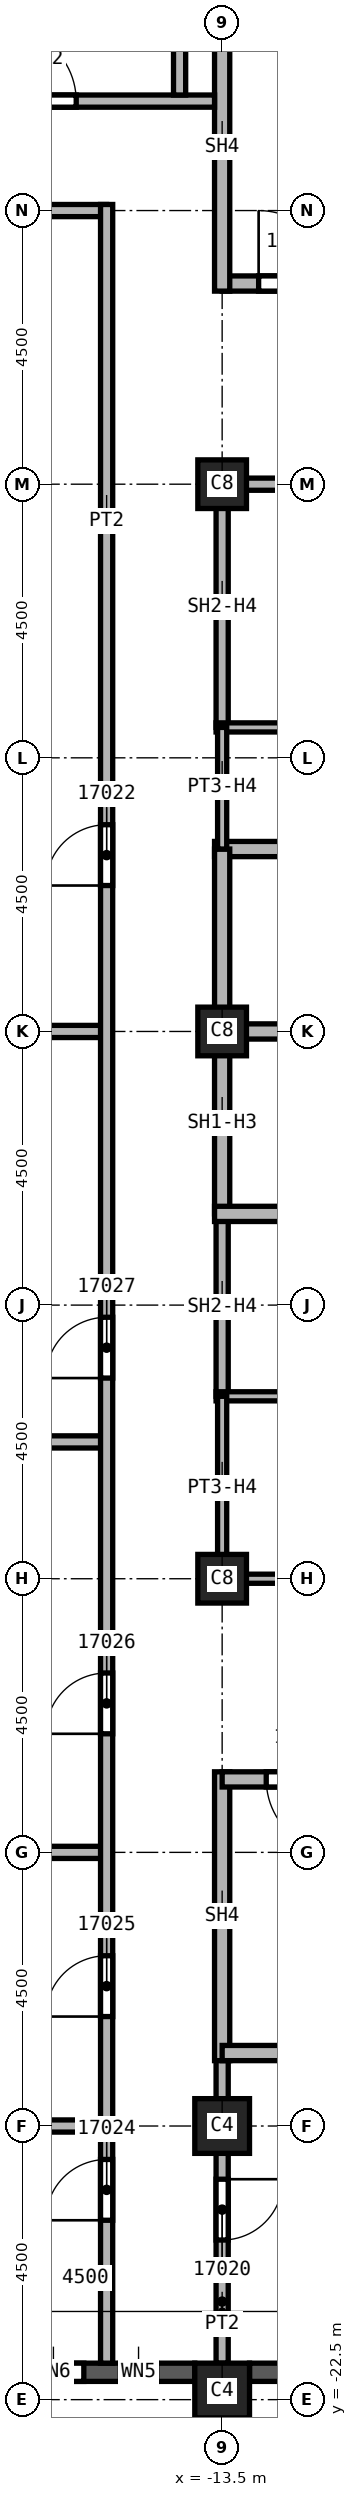
"""IFC4 building model, lengths in metres.
Left out: names, types, materials, properties, quantities, classifications, styles, units other than length and angle.
Written with IfcOpenShell. Run it as: python <this file> out.ifc"""

import sys

from ifc_helpers import new_model, si_unit, direction, frame, frame_2d, origin, origin_2d, place, context, subcontext, project, spatial, rectangle, extrude, element, fill, save


model = new_model("IFC4")
c1 = context("Model", 3, precision=1e-05, world=origin(), true_north=direction((0.0, 1.0)))
c2 = subcontext(c1, "Body", "Model", "MODEL_VIEW")
j1 = project(units=[si_unit("LENGTHUNIT", "METRE"), si_unit("PLANEANGLEUNIT", "RADIAN")], contexts=[c1])
p1 = place(None, origin())
s1 = spatial("IfcSite", under=j1, at=p1, CompositionType="ELEMENT")
p2 = place(p1, origin())
s2 = spatial("IfcBuilding", under=s1, at=p2, CompositionType="ELEMENT")
p3 = place(p2, frame((0.0, 0.0, 254.0)))
s3 = spatial("IfcBuildingStorey", under=s2, at=p3, CompositionType="ELEMENT", Elevation=254.0)
p4 = place(p3, frame((-13.5, -18.0, 0.0), z_axis=(0.0, 0.0, 1.0), x_axis=(1.0, 0.0, 0.0)))
e1 = element("IfcColumn", 1, at=p4, inside=s3, PredefinedType="COLUMN", context=c2, shape_type="SweptSolid", body=[
    extrude(rectangle(XDim=0.9, YDim=0.9, at=origin_2d()), origin(), (0.0, 0.0, 1.0), 3.72),
])
for number, where, z_axis, x_axis in (
    (2, (-13.5, 0.0, 0.0), (0.0, 0.0, 1.0), (1.0, 0.0, 0.0)),
    (3, (-13.5, 9.0, 0.0), (0.0, 0.0, 1.0), (1.0, 0.0, 0.0)),
    (4, (-13.5, -9.0, 0.0), (0.0, 0.0, 1.0), (1.0, 0.0, 0.0)),
):
    element("IfcColumn", number, at=place(p3, frame(where, z_axis=z_axis, x_axis=x_axis)), inside=s3, PredefinedType="COLUMN", context=c2, shape_type="SweptSolid", body=[
        extrude(rectangle(XDim=0.8, YDim=0.8, at=origin_2d()), origin(), (0.0, 0.0, 1.0), 3.72),
    ])
p5 = place(p3, frame((-13.5, -22.35, 0.0), z_axis=(0.0, 0.0, 1.0), x_axis=(1.0, 0.0, 0.0)))
e5 = element("IfcColumn", 5, at=p5, inside=s3, PredefinedType="COLUMN", context=c2, shape_type="SweptSolid", body=[
    extrude(rectangle(XDim=0.9, YDim=0.9, at=origin_2d()), origin(), (0.0, 0.0, 1.0), 3.72),
])
p6 = place(p3, frame((-17.55, -22.05, 0.0), z_axis=(0.0, 0.0, 1.0), x_axis=(1.0, 0.0, 0.0)))
e6 = element("IfcWall", 6, at=p6, inside=s3, PredefinedType="SOLIDWALL", context=c2, shape_type="SweptSolid", body=[
    extrude(rectangle(XDim=3.6, YDim=0.3, at=frame_2d((1.8, 0.0))), origin(), (0.0, 0.0, 1.0), 3.12),
])
p7 = place(p6, frame((0.775, 0.0, 0.8)))
e7 = element("IfcOpeningElement", 7, at=p7, cuts=e6, PredefinedType="OPENING", context=c2, shape_type="SweptSolid", body=[
    extrude(rectangle(XDim=1.0, YDim=1.95, at=frame_2d((0.5, 0.975))), frame((0.0, 0.15, 0.0), z_axis=(0.0, -1.0, 0.0), x_axis=(1.0, 0.0, 0.0)), (0.0, 0.0, 1.0), 0.3),
])
p8 = place(p6, frame((2.375, 0.0, 0.8)))
e8 = element("IfcOpeningElement", 8, at=p8, cuts=e6, PredefinedType="OPENING", context=c2, shape_type="SweptSolid", body=[
    extrude(rectangle(XDim=0.6, YDim=1.95, at=frame_2d((0.3, 0.975))), frame((0.0, 0.15, 0.0), z_axis=(0.0, -1.0, 0.0), x_axis=(1.0, 0.0, 0.0)), (0.0, 0.0, 1.0), 0.3),
])
p9 = place(p3, frame((-13.05, -22.05, 0.0), z_axis=(0.0, 0.0, 1.0), x_axis=(1.0, 0.0, 0.0)))
e9 = element("IfcWall", 9, at=p9, inside=s3, PredefinedType="SOLIDWALL", context=c2, shape_type="SweptSolid", body=[
    extrude(rectangle(XDim=3.6, YDim=0.3, at=frame_2d((1.8, 0.0))), origin(), (0.0, 0.0, 1.0), 3.12),
])
p10 = place(p9, frame((0.6, 0.0, 0.8)))
e10 = element("IfcOpeningElement", 10, at=p10, cuts=e9, PredefinedType="OPENING", context=c2, shape_type="SweptSolid", body=[
    extrude(rectangle(XDim=2.4, YDim=1.95, at=frame_2d((1.2, 0.975))), frame((0.0, 0.15, 0.0), z_axis=(0.0, -1.0, 0.0), x_axis=(1.0, 0.0, 0.0)), (0.0, 0.0, 1.0), 0.3),
])
p11 = place(p3, frame((-26.55, -13.5, 0.0), z_axis=(0.0, 0.0, 1.0), x_axis=(1.0, 0.0, 0.0)))
e11 = element("IfcWall", 11, at=p11, inside=s3, PredefinedType="PARTITIONING", context=c2, shape_type="SweptSolid", body=[
    extrude(rectangle(XDim=11.15, YDim=0.2, at=frame_2d((5.575, 0.0))), origin(), (0.0, 0.0, 1.0), 3.72),
])
p12 = place(p3, frame((-24.3, -18.0, 0.0), z_axis=(0.0, 0.0, 1.0), x_axis=(1.0, 0.0, 0.0)))
e12 = element("IfcWall", 12, at=p12, inside=s3, PredefinedType="PARTITIONING", context=c2, shape_type="SweptSolid", body=[
    extrude(rectangle(XDim=8.9, YDim=0.2, at=frame_2d((4.45, 0.0))), origin(), (0.0, 0.0, 1.0), 3.72),
])
p13 = place(p3, frame((-20.0, -6.75, 0.0), z_axis=(0.0, 0.0, 1.0), x_axis=(1.0, 0.0, 0.0)))
e13 = element("IfcWall", 13, at=p13, inside=s3, PredefinedType="PARTITIONING", context=c2, shape_type="SweptSolid", body=[
    extrude(rectangle(XDim=4.6, YDim=0.2, at=frame_2d((2.3, 0.0))), origin(), (0.0, 0.0, 1.0), 3.72),
])
p14 = place(p3, frame((-15.4, 0.0, 0.0), z_axis=(0.0, 0.0, 1.0), x_axis=(-1.0, 0.0, 0.0)))
e14 = element("IfcWall", 14, at=p14, inside=s3, PredefinedType="PARTITIONING", context=c2, shape_type="SweptSolid", body=[
    extrude(rectangle(XDim=11.15, YDim=0.2, at=frame_2d((5.575, 0.0))), origin(), (0.0, 0.0, 1.0), 3.72),
])
p15 = place(p3, frame((-15.4, 13.5, 0.0), z_axis=(0.0, 0.0, 1.0), x_axis=(-1.0, 0.0, 0.0)))
e15 = element("IfcWall", 15, at=p15, inside=s3, PredefinedType="PARTITIONING", context=c2, shape_type="SweptSolid", body=[
    extrude(rectangle(XDim=6.6, YDim=0.2, at=frame_2d((3.3, 0.0))), origin(), (0.0, 0.0, 1.0), 3.72),
])
p16 = place(p15, frame((5.07, 0.0, 0.0)))
e16 = element("IfcOpeningElement", 16, at=p16, cuts=e15, PredefinedType="OPENING", context=c2, shape_type="SweptSolid", body=[
    extrude(rectangle(XDim=0.9, YDim=2.1, at=frame_2d((0.45, 1.05))), frame((0.0, 0.1, 0.0), z_axis=(0.0, -1.0, 0.0), x_axis=(1.0, 0.0, 0.0)), (0.0, 0.0, 1.0), 0.2),
])
p17 = place(p3, frame((-15.4, -21.9, 0.0), z_axis=(0.0, 0.0, 1.0), x_axis=(0.0, 1.0, 0.0)))
e17 = element("IfcWall", 17, at=p17, inside=s3, PredefinedType="PARTITIONING", context=c2, shape_type="SweptSolid", body=[
    extrude(rectangle(XDim=35.5, YDim=0.2, at=frame_2d((17.75, 0.0))), origin(), (0.0, 0.0, 1.0), 3.72),
])
p18 = place(p17, frame((24.3, 0.0, 0.0)))
e18 = element("IfcOpeningElement", 18, at=p18, cuts=e17, PredefinedType="OPENING", context=c2, shape_type="SweptSolid", body=[
    extrude(rectangle(XDim=1.0, YDim=2.1, at=frame_2d((0.5, 1.05))), frame((0.0, 0.1, 0.0), z_axis=(0.0, -1.0, 0.0), x_axis=(1.0, 0.0, 0.0)), (0.0, 0.0, 1.0), 0.2),
])
p19 = place(p17, frame((2.35, 0.0, 0.0)))
e19 = element("IfcOpeningElement", 19, at=p19, cuts=e17, PredefinedType="OPENING", context=c2, shape_type="SweptSolid", body=[
    extrude(rectangle(XDim=1.0, YDim=2.1, at=frame_2d((0.5, 1.05))), frame((0.0, 0.1, 0.0), z_axis=(0.0, -1.0, 0.0), x_axis=(1.0, 0.0, 0.0)), (0.0, 0.0, 1.0), 0.2),
])
p20 = place(p17, frame((5.7, 0.0, 0.0)))
e20 = element("IfcOpeningElement", 20, at=p20, cuts=e17, PredefinedType="OPENING", context=c2, shape_type="SweptSolid", body=[
    extrude(rectangle(XDim=1.0, YDim=2.1, at=frame_2d((0.5, 1.05))), frame((0.0, 0.1, 0.0), z_axis=(0.0, -1.0, 0.0), x_axis=(1.0, 0.0, 0.0)), (0.0, 0.0, 1.0), 0.2),
])
p21 = place(p17, frame((10.35, 0.0, 0.0)))
e21 = element("IfcOpeningElement", 21, at=p21, cuts=e17, PredefinedType="OPENING", context=c2, shape_type="SweptSolid", body=[
    extrude(rectangle(XDim=1.0, YDim=2.1, at=frame_2d((0.5, 1.05))), frame((0.0, 0.1, 0.0), z_axis=(0.0, -1.0, 0.0), x_axis=(1.0, 0.0, 0.0)), (0.0, 0.0, 1.0), 0.2),
])
p22 = place(p17, frame((16.2, 0.0, 0.0)))
e22 = element("IfcOpeningElement", 22, at=p22, cuts=e17, PredefinedType="OPENING", context=c2, shape_type="SweptSolid", body=[
    extrude(rectangle(XDim=1.0, YDim=2.1, at=frame_2d((0.5, 1.05))), frame((0.0, 0.1, 0.0), z_axis=(0.0, -1.0, 0.0), x_axis=(1.0, 0.0, 0.0)), (0.0, 0.0, 1.0), 0.2),
])
p23 = place(p3, frame((-13.5, -16.675, 0.0), z_axis=(0.0, 0.0, 1.0), x_axis=(0.0, -1.0, 0.0)))
e23 = element("IfcWall", 23, at=p23, inside=s3, PredefinedType="PARTITIONING", context=c2, shape_type="SweptSolid", body=[
    extrude(rectangle(XDim=5.225, YDim=0.2, at=frame_2d((2.612, 0.0))), origin(), (0.0, 0.0, 1.0), 3.72),
])
p24 = place(p23, frame((2.2, 0.0, 0.0)))
e24 = element("IfcOpeningElement", 24, at=p24, cuts=e23, PredefinedType="OPENING", context=c2, shape_type="SweptSolid", body=[
    extrude(rectangle(XDim=1.0, YDim=2.1, at=frame_2d((0.5, 1.05))), frame((0.0, 0.1, 0.0), z_axis=(0.0, -1.0, 0.0), x_axis=(1.0, 0.0, 0.0)), (0.0, 0.0, 1.0), 0.2),
])
p25 = place(p3, frame((-13.5, -6.0, 0.0), z_axis=(0.0, 0.0, 1.0), x_axis=(0.0, 1.0, 0.0)))
e25 = element("IfcWall", 25, at=p25, inside=s3, PredefinedType="SOLIDWALL", context=c2, shape_type="SweptSolid", body=[
    extrude(rectangle(XDim=3.0, YDim=0.2, at=frame_2d((1.5, 0.0))), origin(), (0.0, 0.0, 1.0), 3.042),
])
p26 = place(p3, frame((-13.5, 5.0, 0.0), z_axis=(0.0, 0.0, 1.0), x_axis=(0.0, 1.0, 0.0)))
e26 = element("IfcWall", 26, at=p26, inside=s3, PredefinedType="SOLIDWALL", context=c2, shape_type="SweptSolid", body=[
    extrude(rectangle(XDim=4.1, YDim=0.2, at=frame_2d((2.05, 0.0))), origin(), (0.0, 0.0, 1.0), 3.042),
])
p27 = place(p3, frame((-13.5, 9.0, 0.0), z_axis=(0.0, 0.0, 1.0), x_axis=(1.0, 0.0, 0.0)))
e27 = element("IfcWall", 27, at=p27, inside=s3, PredefinedType="SOLIDWALL", context=c2, shape_type="SweptSolid", body=[
    extrude(rectangle(XDim=3.0, YDim=0.2, at=frame_2d((1.5, 0.0))), origin(), (0.0, 0.0, 1.0), 3.042),
])
p28 = place(p3, frame((-13.625, 0.0, 0.0), z_axis=(0.0, 0.0, 1.0), x_axis=(1.0, 0.0, 0.0)))
e28 = element("IfcWall", 28, at=p28, inside=s3, PredefinedType="SOLIDWALL", context=c2, shape_type="SweptSolid", body=[
    extrude(rectangle(XDim=3.125, YDim=0.25, at=frame_2d((1.562, 0.0))), origin(), (0.0, 0.0, 1.0), 3.72),
])
p29 = place(p3, frame((-13.625, 3.0, 0.0), z_axis=(0.0, 0.0, 1.0), x_axis=(1.0, 0.0, 0.0)))
e29 = element("IfcWall", 29, at=p29, inside=s3, PredefinedType="SOLIDWALL", context=c2, shape_type="SweptSolid", body=[
    extrude(rectangle(XDim=9.25, YDim=0.25, at=frame_2d((4.625, 0.0))), origin(), (0.0, 0.0, 1.0), 3.72),
])
p30 = place(p29, frame((3.25, 0.0, 0.0)))
e30 = element("IfcOpeningElement", 30, at=p30, cuts=e29, PredefinedType="OPENING", context=c2, shape_type="SweptSolid", body=[
    extrude(rectangle(XDim=1.1, YDim=2.1, at=frame_2d((0.55, 1.05))), frame((0.0, 0.125, 0.0), z_axis=(0.0, -1.0, 0.0), x_axis=(1.0, 0.0, 0.0)), (0.0, 0.0, 1.0), 0.25),
])
p31 = place(p3, frame((-13.5, -3.0, 0.0), z_axis=(0.0, 0.0, 1.0), x_axis=(0.0, 1.0, 0.0)))
e31 = element("IfcWall", 31, at=p31, inside=s3, PredefinedType="SOLIDWALL", context=c2, shape_type="SweptSolid", body=[
    extrude(rectangle(XDim=6.0, YDim=0.25, at=frame_2d((3.0, 0.0))), origin(), (0.0, 0.0, 1.0), 3.042),
])
p32 = place(p3, frame((-13.625, -3.0, 0.0), z_axis=(0.0, 0.0, 1.0), x_axis=(1.0, 0.0, 0.0)))
e32 = element("IfcWall", 32, at=p32, inside=s3, PredefinedType="SOLIDWALL", context=c2, shape_type="SweptSolid", body=[
    extrude(rectangle(XDim=6.125, YDim=0.25, at=frame_2d((3.062, 0.0))), origin(), (0.0, 0.0, 1.0), 3.72),
])
p33 = place(p32, frame((3.25, 0.0, 0.0)))
e33 = element("IfcOpeningElement", 33, at=p33, cuts=e32, PredefinedType="OPENING", context=c2, shape_type="SweptSolid", body=[
    extrude(rectangle(XDim=1.1, YDim=2.1, at=frame_2d((0.55, 1.05))), frame((0.0, 0.125, 0.0), z_axis=(0.0, -1.0, 0.0), x_axis=(1.0, 0.0, 0.0)), (0.0, 0.0, 1.0), 0.25),
])
p34 = place(p3, frame((-13.5, -12.175, 0.0), z_axis=(0.0, 0.0, 1.0), x_axis=(0.0, -1.0, 0.0)))
e34 = element("IfcWall", 34, at=p34, inside=s3, PredefinedType="SOLIDWALL", context=c2, shape_type="SweptSolid", body=[
    extrude(rectangle(XDim=4.75, YDim=0.25, at=frame_2d((2.375, 0.0))), origin(), (0.0, 0.0, 1.0), 3.72),
])
p35 = place(p3, frame((-13.5, 12.3, 0.0), z_axis=(0.0, 0.0, 1.0), x_axis=(1.0, 0.0, 0.0)))
e35 = element("IfcWall", 35, at=p35, inside=s3, PredefinedType="SOLIDWALL", context=c2, shape_type="SweptSolid", body=[
    extrude(rectangle(XDim=9.125, YDim=0.25, at=frame_2d((4.562, 0.0))), origin(), (0.0, 0.0, 1.0), 3.72),
])
p36 = place(p35, frame((0.6, 0.0, 0.0)))
e36 = element("IfcOpeningElement", 36, at=p36, cuts=e35, PredefinedType="OPENING", context=c2, shape_type="SweptSolid", body=[
    extrude(rectangle(XDim=1.2, YDim=2.1, at=frame_2d((0.6, 1.05))), frame((0.0, 0.125, 0.0), z_axis=(0.0, -1.0, 0.0), x_axis=(1.0, 0.0, 0.0)), (0.0, 0.0, 1.0), 0.25),
])
p37 = place(p3, frame((-13.5, 16.78, 0.0), z_axis=(0.0, 0.0, 1.0), x_axis=(0.0, -1.0, 0.0)))
e37 = element("IfcWall", 37, at=p37, inside=s3, PredefinedType="SOLIDWALL", context=c2, shape_type="SweptSolid", body=[
    extrude(rectangle(XDim=4.605, YDim=0.25, at=frame_2d((2.302, 0.0))), origin(), (0.0, 0.0, 1.0), 3.72),
])
p38 = place(p3, frame((-4.5, -16.8, 0.0), z_axis=(0.0, 0.0, 1.0), x_axis=(-1.0, 0.0, 0.0)))
e38 = element("IfcWall", 38, at=p38, inside=s3, PredefinedType="SOLIDWALL", context=c2, shape_type="SweptSolid", body=[
    extrude(rectangle(XDim=9.0, YDim=0.25, at=frame_2d((4.5, 0.0))), origin(), (0.0, 0.0, 1.0), 3.72),
])
p39 = place(p3, frame((-4.375, -12.3, 0.0), z_axis=(0.0, 0.0, 1.0), x_axis=(-1.0, 0.0, 0.0)))
e39 = element("IfcWall", 39, at=p39, inside=s3, PredefinedType="SOLIDWALL", context=c2, shape_type="SweptSolid", body=[
    extrude(rectangle(XDim=9.125, YDim=0.25, at=frame_2d((4.562, 0.0))), origin(), (0.0, 0.0, 1.0), 3.72),
])
p40 = place(p39, frame((7.2, 0.0, 0.0)))
e40 = element("IfcOpeningElement", 40, at=p40, cuts=e39, PredefinedType="OPENING", context=c2, shape_type="SweptSolid", body=[
    extrude(rectangle(XDim=1.2, YDim=2.1, at=frame_2d((0.6, 1.05))), frame((0.0, 0.125, 0.0), z_axis=(0.0, -1.0, 0.0), x_axis=(1.0, 0.0, 0.0)), (0.0, 0.0, 1.0), 0.25),
])
for number, where, z_axis, x_axis in (
    (41, (-13.6, -6.0, 0.0), (0.0, 0.0, 1.0), (1.0, 0.0, 0.0)),
    (42, (-13.6, 5.0, 0.0), (0.0, 0.0, 1.0), (1.0, 0.0, 0.0)),
):
    element("IfcWall", number, at=place(p3, frame(where, z_axis=z_axis, x_axis=x_axis)), inside=s3, PredefinedType="PARTITIONING", context=c2, shape_type="SweptSolid", body=[
        extrude(rectangle(XDim=3.1, YDim=0.15, at=frame_2d((1.55, 0.0))), origin(), (0.0, 0.0, 1.0), 3.72),
    ])
p41 = place(p3, frame((-13.5, -9.075, 0.0), z_axis=(0.0, 0.0, 1.0), x_axis=(0.0, 1.0, 0.0)))
e43 = element("IfcWall", 43, at=p41, inside=s3, PredefinedType="PARTITIONING", context=c2, shape_type="SweptSolid", body=[
    extrude(rectangle(XDim=3.075, YDim=0.15, at=frame_2d((1.538, 0.0))), origin(), (0.0, 0.0, 1.0), 3.042),
])
p42 = place(p3, frame((-13.5, 3.0, 0.0), z_axis=(0.0, 0.0, 1.0), x_axis=(0.0, 1.0, 0.0)))
e44 = element("IfcWall", 44, at=p42, inside=s3, PredefinedType="PARTITIONING", context=c2, shape_type="SweptSolid", body=[
    extrude(rectangle(XDim=2.0, YDim=0.15, at=frame_2d((1.0, 0.0))), origin(), (0.0, 0.0, 1.0), 3.042),
])
p43 = place(p3, frame((-10.5, -9.0, 0.0), z_axis=(0.0, 0.0, 1.0), x_axis=(-1.0, 0.0, 0.0)))
e45 = element("IfcWall", 45, at=p43, inside=s3, PredefinedType="PARTITIONING", context=c2, shape_type="SweptSolid", body=[
    extrude(rectangle(XDim=3.0, YDim=0.15, at=frame_2d((1.5, 0.0))), origin(), (0.0, 0.0, 1.0), 3.042),
])
p44 = place(p3, frame((-21.9, 15.3, 0.0), z_axis=(0.0, 0.0, 1.0), x_axis=(1.0, 0.0, 0.0)))
e46 = element("IfcWall", 46, at=p44, inside=s3, PredefinedType="SOLIDWALL", context=c2, shape_type="SweptSolid", body=[
    extrude(rectangle(XDim=8.275, YDim=0.2, at=frame_2d((4.137, 0.0))), origin(), (0.0, 0.0, 1.0), 3.72),
])
p45 = place(p44, frame((4.8, 0.0, 0.0)))
e47 = element("IfcOpeningElement", 47, at=p45, cuts=e46, PredefinedType="OPENING", context=c2, shape_type="SweptSolid", body=[
    extrude(rectangle(XDim=1.2, YDim=2.1, at=frame_2d((0.6, 1.05))), frame((0.0, 0.1, 0.0), z_axis=(0.0, -1.0, 0.0), x_axis=(1.0, 0.0, 0.0)), (0.0, 0.0, 1.0), 0.2),
])
p46 = place(p3, frame((-14.2, 15.4, 0.0), z_axis=(0.0, 0.0, 1.0), x_axis=(0.0, 1.0, 0.0)))
e48 = element("IfcWall", 48, at=p46, inside=s3, PredefinedType="SOLIDWALL", context=c2, shape_type="SweptSolid", body=[
    extrude(rectangle(XDim=5.9, YDim=0.2, at=frame_2d((2.95, 0.0))), origin(), (0.0, 0.0, 1.0), 3.72),
])
p47 = place(p36, origin())
e49 = element("IfcDoor", 49, at=p47, inside=s3, OperationType="SINGLE_SWING_RIGHT", PredefinedType="DOOR", context=c2, shape_type="SweptSolid", body=[
    extrude(rectangle(XDim=1.2, YDim=2.1, at=frame_2d((0.6, 1.05))), frame((0.0, 0.025, 0.0), z_axis=(0.0, -1.0, 0.0), x_axis=(1.0, 0.0, 0.0)), (0.0, 0.0, 1.0), 0.05),
])
fill(e36, e49)
p48 = place(p40, origin())
e50 = element("IfcDoor", 50, at=p48, inside=s3, OperationType="SINGLE_SWING_LEFT", PredefinedType="DOOR", context=c2, shape_type="SweptSolid", body=[
    extrude(rectangle(XDim=1.2, YDim=2.1, at=frame_2d((0.6, 1.05))), frame((0.0, 0.025, 0.0), z_axis=(0.0, -1.0, 0.0), x_axis=(1.0, 0.0, 0.0)), (0.0, 0.0, 1.0), 0.05),
])
fill(e40, e50)
p49 = place(p24, origin())
e51 = element("IfcDoor", 51, at=p49, inside=s3, OperationType="SINGLE_SWING_LEFT", PredefinedType="DOOR", context=c2, shape_type="SweptSolid", body=[
    extrude(rectangle(XDim=1.0, YDim=2.1, at=frame_2d((0.5, 1.05))), frame((0.0, 0.025, 0.0), z_axis=(0.0, -1.0, 0.0), x_axis=(1.0, 0.0, 0.0)), (0.0, 0.0, 1.0), 0.05),
])
fill(e24, e51)
p50 = place(p18, origin())
e52 = element("IfcDoor", 52, at=p50, inside=s3, OperationType="SINGLE_SWING_LEFT", PredefinedType="DOOR", context=c2, shape_type="SweptSolid", body=[
    extrude(rectangle(XDim=1.0, YDim=2.1, at=frame_2d((0.5, 1.05))), frame((0.0, 0.025, 0.0), z_axis=(0.0, -1.0, 0.0), x_axis=(1.0, 0.0, 0.0)), (0.0, 0.0, 1.0), 0.05),
])
fill(e18, e52)
p51 = place(p19, origin())
e53 = element("IfcDoor", 53, at=p51, inside=s3, OperationType="SINGLE_SWING_LEFT", PredefinedType="DOOR", context=c2, shape_type="SweptSolid", body=[
    extrude(rectangle(XDim=1.0, YDim=2.1, at=frame_2d((0.5, 1.05))), frame((0.0, 0.025, 0.0), z_axis=(0.0, -1.0, 0.0), x_axis=(1.0, 0.0, 0.0)), (0.0, 0.0, 1.0), 0.05),
])
fill(e19, e53)
p52 = place(p20, origin())
e54 = element("IfcDoor", 54, at=p52, inside=s3, OperationType="SINGLE_SWING_RIGHT", PredefinedType="DOOR", context=c2, shape_type="SweptSolid", body=[
    extrude(rectangle(XDim=1.0, YDim=2.1, at=frame_2d((0.5, 1.05))), frame((0.0, 0.025, 0.0), z_axis=(0.0, -1.0, 0.0), x_axis=(1.0, 0.0, 0.0)), (0.0, 0.0, 1.0), 0.05),
])
fill(e20, e54)
p53 = place(p21, origin())
e55 = element("IfcDoor", 55, at=p53, inside=s3, OperationType="SINGLE_SWING_LEFT", PredefinedType="DOOR", context=c2, shape_type="SweptSolid", body=[
    extrude(rectangle(XDim=1.0, YDim=2.1, at=frame_2d((0.5, 1.05))), frame((0.0, 0.025, 0.0), z_axis=(0.0, -1.0, 0.0), x_axis=(1.0, 0.0, 0.0)), (0.0, 0.0, 1.0), 0.05),
])
fill(e21, e55)
p54 = place(p22, origin())
e56 = element("IfcDoor", 56, at=p54, inside=s3, OperationType="SINGLE_SWING_RIGHT", PredefinedType="DOOR", context=c2, shape_type="SweptSolid", body=[
    extrude(rectangle(XDim=1.0, YDim=2.1, at=frame_2d((0.5, 1.05))), frame((0.0, 0.025, 0.0), z_axis=(0.0, -1.0, 0.0), x_axis=(1.0, 0.0, 0.0)), (0.0, 0.0, 1.0), 0.05),
])
fill(e22, e56)
p55 = place(p45, origin())
e57 = element("IfcDoor", 57, at=p55, inside=s3, OperationType="SINGLE_SWING_RIGHT", PredefinedType="DOOR", context=c2, shape_type="SweptSolid", body=[
    extrude(rectangle(XDim=1.2, YDim=2.1, at=frame_2d((0.6, 1.05))), frame((0.0, 0.025, 0.0), z_axis=(0.0, -1.0, 0.0), x_axis=(1.0, 0.0, 0.0)), (0.0, 0.0, 1.0), 0.05),
])
fill(e47, e57)
p56 = place(p7, origin())
e58 = element("IfcWindow", 58, at=p56, inside=s3, PartitioningType="SINGLE_PANEL", PredefinedType="WINDOW", context=c2, shape_type="SweptSolid", body=[
    extrude(rectangle(XDim=1.0, YDim=1.95, at=frame_2d((0.5, 0.975))), frame((0.0, 0.03, 0.0), z_axis=(0.0, -1.0, 0.0), x_axis=(1.0, 0.0, 0.0)), (0.0, 0.0, 1.0), 0.06),
])
fill(e7, e58)
p57 = place(p8, origin())
e59 = element("IfcWindow", 59, at=p57, inside=s3, PartitioningType="SINGLE_PANEL", PredefinedType="WINDOW", context=c2, shape_type="SweptSolid", body=[
    extrude(rectangle(XDim=0.6, YDim=1.95, at=frame_2d((0.3, 0.975))), frame((0.0, 0.03, 0.0), z_axis=(0.0, -1.0, 0.0), x_axis=(1.0, 0.0, 0.0)), (0.0, 0.0, 1.0), 0.06),
])
fill(e8, e59)
save(model, sys.argv[1])
